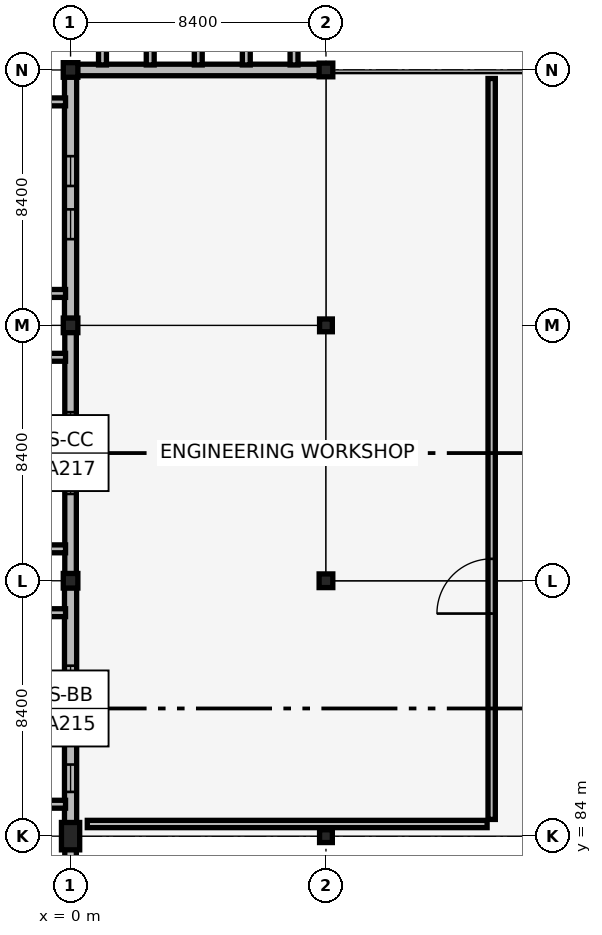
"""IFC4 building model, lengths in metres.
Left out: names, types, materials, properties, quantities, classifications, styles, units other than length and angle.
Written with IfcOpenShell. Run it as: python <this file> out.ifc"""

import sys

from ifc_helpers import new_model, si_unit, direction, frame, frame_2d, origin, origin_2d, place, context, subcontext, project, spatial, rectangle, extrude, element, fill, save


model = new_model("IFC4")
c1 = context("Model", 3, precision=1e-05, world=origin(), true_north=direction((0.0, 1.0)))
c2 = subcontext(c1, "Body", "Model", "MODEL_VIEW")
j1 = project(units=[si_unit("LENGTHUNIT", "METRE"), si_unit("PLANEANGLEUNIT", "RADIAN")], contexts=[c1])
p1 = place(None, origin())
s1 = spatial("IfcSite", under=j1, at=p1, CompositionType="ELEMENT")
p2 = place(p1, origin())
s2 = spatial("IfcBuilding", under=s1, at=p2, CompositionType="ELEMENT")
p3 = place(p2, frame((0.0, 0.0, 5.44)))
s3 = spatial("IfcBuildingStorey", under=s2, at=p3, CompositionType="ELEMENT", Elevation=5.44)
p4 = place(p3, frame((0.0, 84.0, 0.0), z_axis=(0.0, 0.0, 1.0), x_axis=(1.0, 0.0, 0.0)))
e1 = element("IfcColumn", 1, at=p4, inside=s3, PredefinedType="COLUMN", context=c2, shape_type="SweptSolid", body=[
    extrude(rectangle(XDim=0.6, YDim=0.9, at=origin_2d()), origin(), (0.0, 0.0, 1.0), 4.12),
])
for number, where, z_axis, x_axis in (
    (2, (0.0, 92.4, 0.0), (0.0, 0.0, 1.0), (1.0, 0.0, 0.0)),
    (3, (0.0, 100.8, 0.0), (0.0, 0.0, 1.0), (1.0, 0.0, 0.0)),
    (4, (0.0, 109.2, 0.0), (0.0, 0.0, 1.0), (1.0, 0.0, 0.0)),
):
    element("IfcColumn", number, at=place(p3, frame(where, z_axis=z_axis, x_axis=x_axis)), inside=s3, PredefinedType="COLUMN", context=c2, shape_type="SweptSolid", body=[
        extrude(rectangle(XDim=0.48, YDim=0.48, at=origin_2d()), origin(), (0.0, 0.0, 1.0), 4.12),
    ])
p5 = place(p3, frame((8.4, 84.0, 0.0), z_axis=(0.0, 0.0, 1.0), x_axis=(1.0, 0.0, 0.0)))
e5 = element("IfcColumn", 5, at=p5, inside=s3, PredefinedType="COLUMN", context=c2, shape_type="SweptSolid", body=[
    extrude(rectangle(XDim=0.42, YDim=0.42, at=origin_2d()), origin(), (0.0, 0.0, 1.0), 4.12),
])
p6 = place(p3, frame((8.4, 92.4, 0.0), z_axis=(0.0, 0.0, 1.0), x_axis=(1.0, 0.0, 0.0)))
e6 = element("IfcColumn", 6, at=p6, inside=s3, PredefinedType="COLUMN", context=c2, shape_type="SweptSolid", body=[
    extrude(rectangle(XDim=0.45, YDim=0.45, at=origin_2d()), origin(), (0.0, 0.0, 1.0), 4.12),
])
p7 = place(p3, frame((8.4, 100.8, 0.0), z_axis=(0.0, 0.0, 1.0), x_axis=(1.0, 0.0, 0.0)))
e7 = element("IfcColumn", 7, at=p7, inside=s3, PredefinedType="COLUMN", context=c2, shape_type="SweptSolid", body=[
    extrude(rectangle(XDim=0.42, YDim=0.42, at=origin_2d()), origin(), (0.0, 0.0, 1.0), 4.12),
])
p8 = place(p3, frame((8.4, 109.2, 0.0), z_axis=(0.0, 0.0, 1.0), x_axis=(1.0, 0.0, 0.0)))
e8 = element("IfcColumn", 8, at=p8, inside=s3, PredefinedType="COLUMN", context=c2, shape_type="SweptSolid", body=[
    extrude(rectangle(XDim=0.45, YDim=0.45, at=origin_2d()), origin(), (0.0, 0.0, 1.0), 4.12),
])
p9 = place(p3, frame((0.0, 76.035, 0.0), z_axis=(0.0, 0.0, 1.0), x_axis=(0.0, 1.0, 0.0)))
e9 = element("IfcWall", 9, at=p9, inside=s3, PredefinedType="SOLIDWALL", context=c2, shape_type="SweptSolid", body=[
    extrude(rectangle(XDim=7.53, YDim=0.38, at=frame_2d((3.765, 0.0))), origin(), (0.0, 0.0, 1.0), 3.46),
])
p10 = place(p3, frame((0.0, 84.435, 0.0), z_axis=(0.0, 0.0, 1.0), x_axis=(0.0, 1.0, 0.0)))
e10 = element("IfcWall", 10, at=p10, inside=s3, PredefinedType="SOLIDWALL", context=c2, shape_type="SweptSolid", body=[
    extrude(rectangle(XDim=7.74, YDim=0.4, at=frame_2d((3.87, 0.0))), origin(), (0.0, 0.0, 1.0), 4.12),
])
p11 = place(p10, frame((1.021, 0.0, 0.75)))
e11 = element("IfcOpeningElement", 11, at=p11, cuts=e10, PredefinedType="OPENING", context=c2, shape_type="SweptSolid", body=[
    extrude(rectangle(XDim=0.9, YDim=3.0, at=frame_2d((0.45, 1.5))), frame((0.0, 0.21, 0.0), z_axis=(0.0, -1.0, 0.0), x_axis=(1.0, 0.0, 0.0)), (0.0, 0.0, 1.0), 0.42),
])
p12 = place(p10, frame((2.569, 0.0, 0.75)))
e12 = element("IfcOpeningElement", 12, at=p12, cuts=e10, PredefinedType="OPENING", context=c2, shape_type="SweptSolid", body=[
    extrude(rectangle(XDim=0.9, YDim=3.0, at=frame_2d((0.45, 1.5))), frame((0.0, 0.21, 0.0), z_axis=(0.0, -1.0, 0.0), x_axis=(1.0, 0.0, 0.0)), (0.0, 0.0, 1.0), 0.42),
])
p13 = place(p10, frame((4.271, 0.0, 0.75)))
e13 = element("IfcOpeningElement", 13, at=p13, cuts=e10, PredefinedType="OPENING", context=c2, shape_type="SweptSolid", body=[
    extrude(rectangle(XDim=0.9, YDim=3.0, at=frame_2d((0.45, 1.5))), frame((0.0, 0.21, 0.0), z_axis=(0.0, -1.0, 0.0), x_axis=(1.0, 0.0, 0.0)), (0.0, 0.0, 1.0), 0.42),
])
for number, where, z_axis, x_axis in (
    (14, (-0.165, 85.05, 0.0), (0.0, 0.0, 1.0), (-1.0, 0.0, 0.0)),
    (15, (-0.165, 91.35, 0.0), (0.0, 0.0, 1.0), (-1.0, 0.0, 0.0)),
):
    element("IfcWall", number, at=place(p3, frame(where, z_axis=z_axis, x_axis=x_axis)), inside=s3, PredefinedType="SOLIDWALL", context=c2, shape_type="SweptSolid", body=[
        extrude(rectangle(XDim=0.7, YDim=0.26, at=frame_2d((0.35, 0.0))), origin(), (0.0, 0.0, 1.0), 4.42),
    ])
p14 = place(p3, frame((0.0, 92.625, 0.0), z_axis=(0.0, 0.0, 1.0), x_axis=(0.0, 1.0, 0.0)))
e16 = element("IfcWall", 16, at=p14, inside=s3, PredefinedType="SOLIDWALL", context=c2, shape_type="SweptSolid", body=[
    extrude(rectangle(XDim=7.95, YDim=0.38, at=frame_2d((3.975, 0.0))), origin(), (0.0, 0.0, 1.0), 4.12),
])
p15 = place(p14, frame((2.631, 0.0, 0.75)))
e17 = element("IfcOpeningElement", 17, at=p15, cuts=e16, PredefinedType="OPENING", context=c2, shape_type="SweptSolid", body=[
    extrude(rectangle(XDim=0.94, YDim=2.55, at=frame_2d((0.47, 1.275))), frame((0.0, 0.2, 0.0), z_axis=(0.0, -1.0, 0.0), x_axis=(1.0, 0.0, 0.0)), (0.0, 0.0, 1.0), 0.4),
])
p16 = place(p14, frame((4.379, 0.0, 0.75)))
e18 = element("IfcOpeningElement", 18, at=p16, cuts=e16, PredefinedType="OPENING", context=c2, shape_type="SweptSolid", body=[
    extrude(rectangle(XDim=0.94, YDim=2.55, at=frame_2d((0.47, 1.275))), frame((0.0, 0.2, 0.0), z_axis=(0.0, -1.0, 0.0), x_axis=(1.0, 0.0, 0.0)), (0.0, 0.0, 1.0), 0.4),
])
for number, where, z_axis, x_axis in (
    (19, (-0.165, 93.45, 0.0), (0.0, 0.0, 1.0), (-1.0, 0.0, 0.0)),
    (20, (-0.165, 99.75, 0.0), (0.0, 0.0, 1.0), (-1.0, 0.0, 0.0)),
):
    element("IfcWall", number, at=place(p3, frame(where, z_axis=z_axis, x_axis=x_axis)), inside=s3, PredefinedType="SOLIDWALL", context=c2, shape_type="SweptSolid", body=[
        extrude(rectangle(XDim=0.7, YDim=0.26, at=frame_2d((0.35, 0.0))), origin(), (0.0, 0.0, 1.0), 4.42),
    ])
p17 = place(p3, frame((0.225, 109.2, 0.0), z_axis=(0.0, 0.0, 1.0), x_axis=(1.0, 0.0, 0.0)))
e21 = element("IfcWall", 21, at=p17, inside=s3, PredefinedType="SOLIDWALL", context=c2, shape_type="SweptSolid", body=[
    extrude(rectangle(XDim=7.965, YDim=0.38, at=frame_2d((3.982, 0.0))), origin(), (0.0, 0.0, 1.0), 4.12),
])
for number, where, z_axis, x_axis in (
    (22, (1.05, 109.365, 0.0), (0.0, 0.0, 1.0), (0.0, 1.0, 0.0)),
    (23, (2.62, 109.365, 0.0), (0.0, 0.0, 1.0), (0.0, 1.0, 0.0)),
    (24, (4.2, 109.365, 0.0), (0.0, 0.0, 1.0), (0.0, 1.0, 0.0)),
    (25, (5.78, 109.365, 0.0), (0.0, 0.0, 1.0), (0.0, 1.0, 0.0)),
    (26, (7.35, 109.365, 0.0), (0.0, 0.0, 1.0), (0.0, 1.0, 0.0)),
):
    element("IfcWall", number, at=place(p3, frame(where, z_axis=z_axis, x_axis=x_axis)), inside=s3, PredefinedType="SOLIDWALL", context=c2, shape_type="SweptSolid", body=[
        extrude(rectangle(XDim=0.7, YDim=0.26, at=frame_2d((0.35, 0.0))), origin(), (0.0, 0.0, 1.0), 4.42),
    ])
p18 = place(p3, frame((0.0, 101.025, 0.0), z_axis=(0.0, 0.0, 1.0), x_axis=(0.0, 1.0, 0.0)))
e27 = element("IfcWall", 27, at=p18, inside=s3, PredefinedType="SOLIDWALL", context=c2, shape_type="SweptSolid", body=[
    extrude(rectangle(XDim=7.95, YDim=0.4, at=frame_2d((3.975, 0.0))), origin(), (0.0, 0.0, 1.0), 4.12),
])
p19 = place(p18, frame((2.611, 0.0, 0.75)))
e28 = element("IfcOpeningElement", 28, at=p19, cuts=e27, PredefinedType="OPENING", context=c2, shape_type="SweptSolid", body=[
    extrude(rectangle(XDim=0.98, YDim=2.95, at=frame_2d((0.49, 1.475))), frame((0.0, 0.21, 0.0), z_axis=(0.0, -1.0, 0.0), x_axis=(1.0, 0.0, 0.0)), (0.0, 0.0, 1.0), 0.42),
])
p20 = place(p18, frame((4.36, 0.0, 0.75)))
e29 = element("IfcOpeningElement", 29, at=p20, cuts=e27, PredefinedType="OPENING", context=c2, shape_type="SweptSolid", body=[
    extrude(rectangle(XDim=0.98, YDim=2.95, at=frame_2d((0.49, 1.475))), frame((0.0, 0.21, 0.0), z_axis=(0.0, -1.0, 0.0), x_axis=(1.0, 0.0, 0.0)), (0.0, 0.0, 1.0), 0.42),
])
for number, where, z_axis, x_axis in (
    (30, (-0.165, 101.85, 0.0), (0.0, 0.0, 1.0), (-1.0, 0.0, 0.0)),
    (31, (-0.165, 108.15, 0.0), (0.0, 0.0, 1.0), (-1.0, 0.0, 0.0)),
):
    element("IfcWall", number, at=place(p3, frame(where, z_axis=z_axis, x_axis=x_axis)), inside=s3, PredefinedType="SOLIDWALL", context=c2, shape_type="SweptSolid", body=[
        extrude(rectangle(XDim=0.7, YDim=0.26, at=frame_2d((0.35, 0.0))), origin(), (0.0, 0.0, 1.0), 4.42),
    ])
p21 = place(p3, frame((13.85, 84.55, 0.0), z_axis=(0.0, 0.0, 1.0), x_axis=(0.0, 1.0, 0.0)))
e32 = element("IfcWall", 32, at=p21, inside=s3, PredefinedType="PARTITIONING", context=c2, shape_type="SweptSolid", body=[
    extrude(rectangle(XDim=24.37, YDim=0.24, at=frame_2d((12.185, 0.0))), origin(), (0.0, 0.0, 1.0), 4.12),
])
p22 = place(p21, frame((6.771, 0.0, 0.0)))
e33 = element("IfcOpeningElement", 33, at=p22, cuts=e32, PredefinedType="OPENING", context=c2, shape_type="SweptSolid", body=[
    extrude(rectangle(XDim=1.8, YDim=2.4, at=frame_2d((0.9, 1.2))), frame((0.0, 0.13, 0.0), z_axis=(0.0, -1.0, 0.0), x_axis=(1.0, 0.0, 0.0)), (0.0, 0.0, 1.0), 0.26),
])
p23 = place(p3, frame((0.55, 84.4, 0.0), z_axis=(0.0, 0.0, 1.0), x_axis=(1.0, 0.0, 0.0)))
e34 = element("IfcWall", 34, at=p23, inside=s3, PredefinedType="PARTITIONING", context=c2, shape_type="SweptSolid", body=[
    extrude(rectangle(XDim=13.15, YDim=0.24, at=frame_2d((6.575, 0.0))), origin(), (0.0, 0.0, 1.0), 4.12),
])
p24 = place(p11, origin())
e35 = element("IfcWindow", 35, at=p24, inside=s3, PartitioningType="DOUBLE_PANEL_VERTICAL", PredefinedType="WINDOW", context=c2, shape_type="SweptSolid", body=[
    extrude(rectangle(XDim=0.9, YDim=3.0, at=frame_2d((0.45, 1.5))), frame((0.0, 0.03, 0.0), z_axis=(0.0, -1.0, 0.0), x_axis=(1.0, 0.0, 0.0)), (0.0, 0.0, 1.0), 0.06),
])
fill(e11, e35)
p25 = place(p12, origin())
e36 = element("IfcWindow", 36, at=p25, inside=s3, PartitioningType="DOUBLE_PANEL_VERTICAL", PredefinedType="WINDOW", context=c2, shape_type="SweptSolid", body=[
    extrude(rectangle(XDim=0.9, YDim=3.0, at=frame_2d((0.45, 1.5))), frame((0.0, 0.03, 0.0), z_axis=(0.0, -1.0, 0.0), x_axis=(1.0, 0.0, 0.0)), (0.0, 0.0, 1.0), 0.06),
])
fill(e12, e36)
p26 = place(p13, origin())
e37 = element("IfcWindow", 37, at=p26, inside=s3, PartitioningType="DOUBLE_PANEL_VERTICAL", PredefinedType="WINDOW", context=c2, shape_type="SweptSolid", body=[
    extrude(rectangle(XDim=0.9, YDim=3.0, at=frame_2d((0.45, 1.5))), frame((0.0, 0.03, 0.0), z_axis=(0.0, -1.0, 0.0), x_axis=(1.0, 0.0, 0.0)), (0.0, 0.0, 1.0), 0.06),
])
fill(e13, e37)
p27 = place(p15, origin())
e38 = element("IfcWindow", 38, at=p27, inside=s3, PartitioningType="DOUBLE_PANEL_VERTICAL", PredefinedType="WINDOW", context=c2, shape_type="SweptSolid", body=[
    extrude(rectangle(XDim=0.94, YDim=2.55, at=frame_2d((0.47, 1.275))), frame((0.0, 0.03, 0.0), z_axis=(0.0, -1.0, 0.0), x_axis=(1.0, 0.0, 0.0)), (0.0, 0.0, 1.0), 0.06),
])
fill(e17, e38)
p28 = place(p16, origin())
e39 = element("IfcWindow", 39, at=p28, inside=s3, PartitioningType="DOUBLE_PANEL_VERTICAL", PredefinedType="WINDOW", context=c2, shape_type="SweptSolid", body=[
    extrude(rectangle(XDim=0.94, YDim=2.55, at=frame_2d((0.47, 1.275))), frame((0.0, 0.03, 0.0), z_axis=(0.0, -1.0, 0.0), x_axis=(1.0, 0.0, 0.0)), (0.0, 0.0, 1.0), 0.06),
])
fill(e18, e39)
p29 = place(p19, origin())
e40 = element("IfcWindow", 40, at=p29, inside=s3, PartitioningType="DOUBLE_PANEL_VERTICAL", PredefinedType="WINDOW", context=c2, shape_type="SweptSolid", body=[
    extrude(rectangle(XDim=0.98, YDim=2.95, at=frame_2d((0.49, 1.475))), frame((0.0, 0.03, 0.0), z_axis=(0.0, -1.0, 0.0), x_axis=(1.0, 0.0, 0.0)), (0.0, 0.0, 1.0), 0.06),
])
fill(e28, e40)
p30 = place(p20, origin())
e41 = element("IfcWindow", 41, at=p30, inside=s3, PartitioningType="DOUBLE_PANEL_VERTICAL", PredefinedType="WINDOW", context=c2, shape_type="SweptSolid", body=[
    extrude(rectangle(XDim=0.98, YDim=2.95, at=frame_2d((0.49, 1.475))), frame((0.0, 0.03, 0.0), z_axis=(0.0, -1.0, 0.0), x_axis=(1.0, 0.0, 0.0)), (0.0, 0.0, 1.0), 0.06),
])
fill(e29, e41)
p31 = place(p22, origin())
e42 = element("IfcDoor", 42, at=p31, inside=s3, OperationType="DOUBLE_DOOR_SINGLE_SWING", PredefinedType="DOOR", context=c2, shape_type="SweptSolid", body=[
    extrude(rectangle(XDim=1.8, YDim=2.4, at=frame_2d((0.9, 1.2))), frame((0.0, 0.025, 0.0), z_axis=(0.0, -1.0, 0.0), x_axis=(1.0, 0.0, 0.0)), (0.0, 0.0, 1.0), 0.05),
])
fill(e33, e42)
save(model, sys.argv[1])
